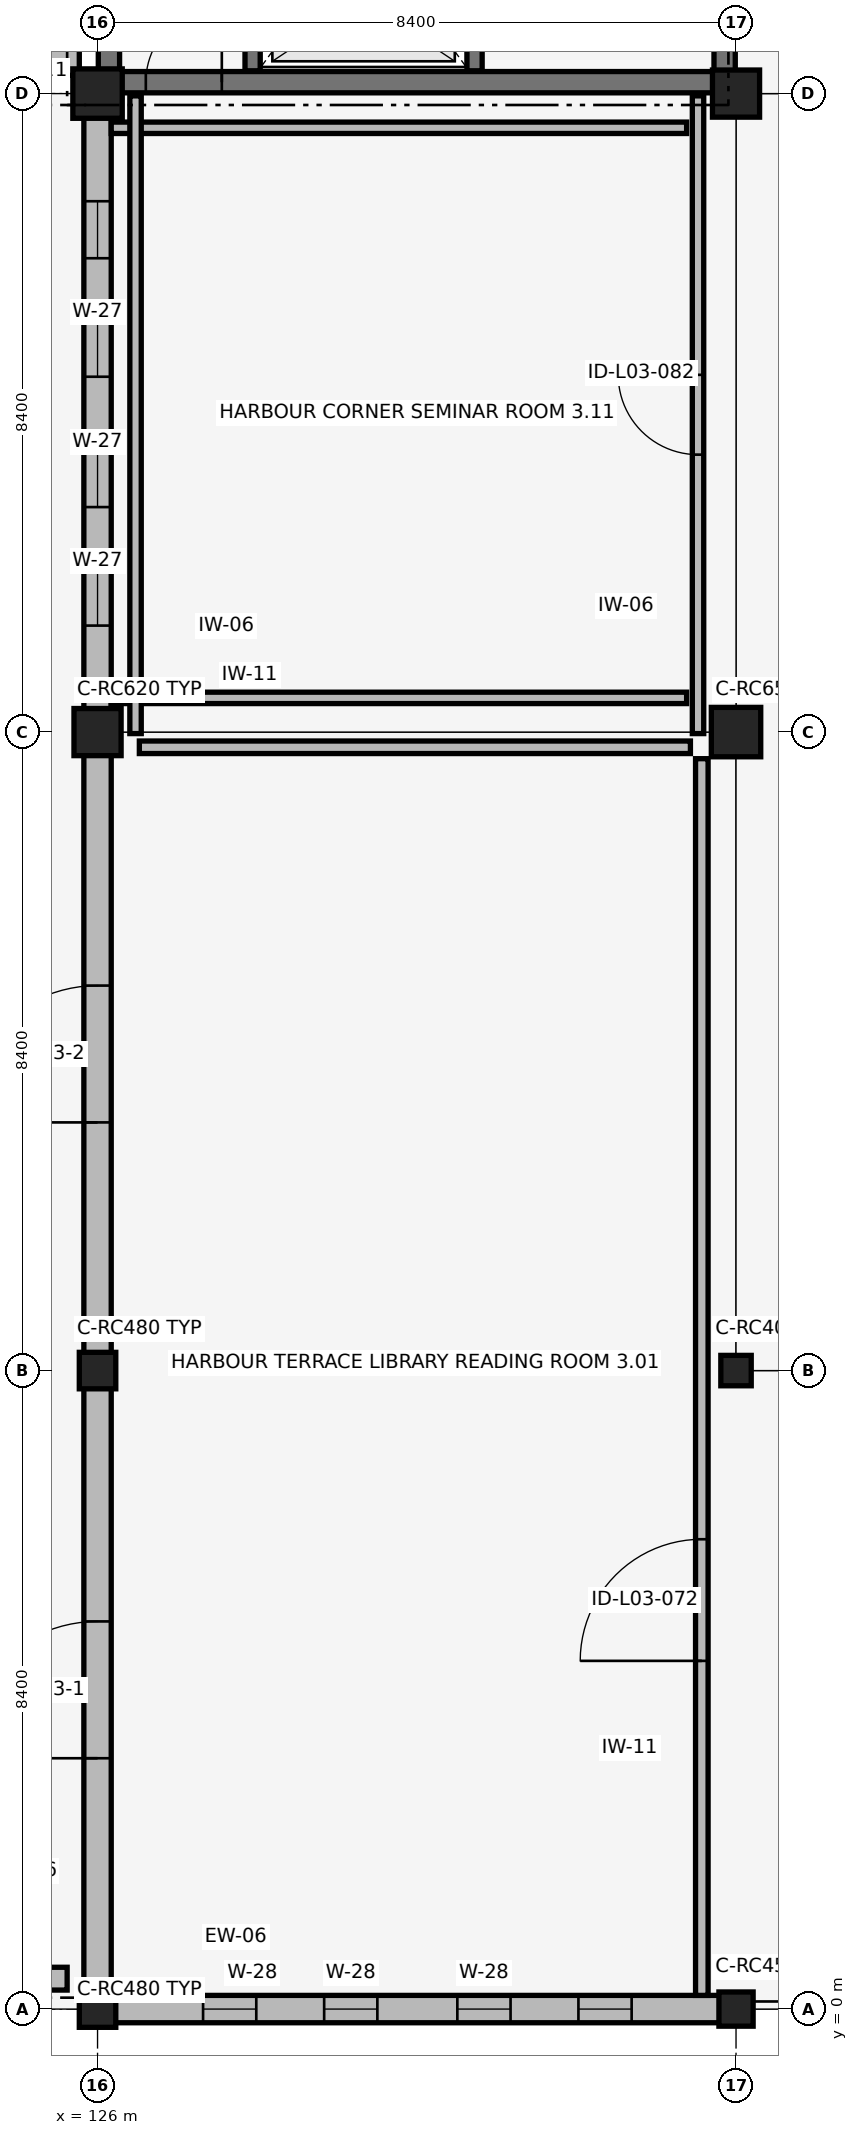
"""IFC4 building model, lengths in metres.
Left out: names, types, materials, properties, quantities, classifications, styles, units other than length and angle.
Written with IfcOpenShell. Run it as: python <this file> out.ifc"""

import sys

from ifc_helpers import new_model, si_unit, direction, frame, frame_2d, origin, origin_2d, place, context, subcontext, project, spatial, rectangle, extrude, element, fill, save


model = new_model("IFC4")
c1 = context("Model", 3, precision=1e-05, world=origin(), true_north=direction((0.0, 1.0)))
c2 = subcontext(c1, "Body", "Model", "MODEL_VIEW")
j1 = project(units=[si_unit("LENGTHUNIT", "METRE"), si_unit("PLANEANGLEUNIT", "RADIAN")], contexts=[c1])
p1 = place(None, origin())
s1 = spatial("IfcSite", under=j1, at=p1, CompositionType="ELEMENT")
p2 = place(p1, origin())
s2 = spatial("IfcBuilding", under=s1, at=p2, CompositionType="ELEMENT")
p3 = place(p2, frame((0.0, 0.0, 13.94)))
s3 = spatial("IfcBuildingStorey", under=s2, at=p3, CompositionType="ELEMENT", Elevation=13.94)
p4 = place(p3, frame((126.15, 25.35, 0.0), z_axis=(0.0, 0.0, 1.0), x_axis=(1.0, 0.0, 0.0)))
e1 = element("IfcWall", 1, at=p4, inside=s3, PredefinedType="SHEAR", context=c2, shape_type="SweptSolid", body=[
    extrude(rectangle(XDim=8.1, YDim=0.28, at=frame_2d((4.05, 0.0))), origin(), (0.0, 0.0, 1.0), 3.78),
])
p5 = place(p4, frame((0.485, 0.0, 0.0)))
e2 = element("IfcOpeningElement", 2, at=p5, cuts=e1, PredefinedType="OPENING", context=c2, shape_type="SweptSolid", body=[
    extrude(rectangle(XDim=1.0, YDim=2.15, at=frame_2d((0.5, 1.075))), frame((0.0, 0.15, 0.0), z_axis=(0.0, -1.0, 0.0), x_axis=(1.0, 0.0, 0.0)), (0.0, 0.0, 1.0), 0.3),
])
p6 = place(p3, frame((126.15, 25.35, 0.0), z_axis=(0.0, 0.0, 1.0), x_axis=(0.0, 1.0, 0.0)))
e3 = element("IfcWall", 3, at=p6, inside=s3, PredefinedType="SHEAR", context=c2, shape_type="SweptSolid", body=[
    extrude(rectangle(XDim=8.1, YDim=0.28, at=frame_2d((4.05, 0.0))), origin(), (0.0, 0.0, 1.0), 3.78),
])
p7 = place(p3, frame((134.25, 25.35, 0.0), z_axis=(0.0, 0.0, 1.0), x_axis=(0.0, 1.0, 0.0)))
e4 = element("IfcWall", 4, at=p7, inside=s3, PredefinedType="SHEAR", context=c2, shape_type="SweptSolid", body=[
    extrude(rectangle(XDim=8.1, YDim=0.28, at=frame_2d((4.05, 0.0))), origin(), (0.0, 0.0, 1.0), 3.78),
])
p8 = place(p7, frame((1.325, 0.0, 0.0)))
e5 = element("IfcOpeningElement", 5, at=p8, cuts=e4, PredefinedType="OPENING", context=c2, shape_type="SweptSolid", body=[
    extrude(rectangle(XDim=1.45, YDim=2.15, at=frame_2d((0.725, 1.075))), frame((0.0, 0.15, 0.0), z_axis=(0.0, -1.0, 0.0), x_axis=(1.0, 0.0, 0.0)), (0.0, 0.0, 1.0), 0.3),
])
for number, where, z_axis, x_axis in (
    (6, (126.0, 0.0, 0.0), (0.0, 0.0, 1.0), (1.0, 0.0, 0.0)),
    (7, (126.0, 8.4, 0.0), (0.0, 0.0, 1.0), (1.0, 0.0, 0.0)),
):
    element("IfcColumn", number, at=place(p3, frame(where, z_axis=z_axis, x_axis=x_axis)), inside=s3, PredefinedType="COLUMN", context=c2, shape_type="SweptSolid", body=[
        extrude(rectangle(XDim=0.48, YDim=0.48, at=origin_2d()), origin(), (0.0, 0.0, 1.0), 3.78),
    ])
p9 = place(p3, frame((126.0, 16.8, 0.0), z_axis=(0.0, 0.0, 1.0), x_axis=(1.0, 0.0, 0.0)))
e8 = element("IfcColumn", 8, at=p9, inside=s3, PredefinedType="COLUMN", context=c2, shape_type="SweptSolid", body=[
    extrude(rectangle(XDim=0.62, YDim=0.62, at=origin_2d()), origin(), (0.0, 0.0, 1.0), 3.78),
])
p10 = place(p3, frame((126.0, 25.2, 0.0), z_axis=(0.0, 0.0, 1.0), x_axis=(1.0, 0.0, 0.0)))
e9 = element("IfcColumn", 9, at=p10, inside=s3, PredefinedType="COLUMN", context=c2, shape_type="SweptSolid", body=[
    extrude(rectangle(XDim=0.65, YDim=0.65, at=origin_2d()), origin(), (0.0, 0.0, 1.0), 3.78),
])
p11 = place(p3, frame((134.4, 0.0, 0.0), z_axis=(0.0, 0.0, 1.0), x_axis=(1.0, 0.0, 0.0)))
e10 = element("IfcColumn", 10, at=p11, inside=s3, PredefinedType="COLUMN", context=c2, shape_type="SweptSolid", body=[
    extrude(rectangle(XDim=0.45, YDim=0.45, at=origin_2d()), origin(), (0.0, 0.0, 1.0), 3.78),
])
p12 = place(p3, frame((134.4, 8.4, 0.0), z_axis=(0.0, 0.0, 1.0), x_axis=(1.0, 0.0, 0.0)))
e11 = element("IfcColumn", 11, at=p12, inside=s3, PredefinedType="COLUMN", context=c2, shape_type="SweptSolid", body=[
    extrude(rectangle(XDim=0.4, YDim=0.4, at=origin_2d()), origin(), (0.0, 0.0, 1.0), 3.78),
])
p13 = place(p3, frame((134.4, 16.8, 0.0), z_axis=(0.0, 0.0, 1.0), x_axis=(1.0, 0.0, 0.0)))
e12 = element("IfcColumn", 12, at=p13, inside=s3, PredefinedType="COLUMN", context=c2, shape_type="SweptSolid", body=[
    extrude(rectangle(XDim=0.65, YDim=0.65, at=origin_2d()), origin(), (0.0, 0.0, 1.0), 3.78),
])
p14 = place(p3, frame((134.4, 25.2, 0.0), z_axis=(0.0, 0.0, 1.0), x_axis=(1.0, 0.0, 0.0)))
e13 = element("IfcColumn", 13, at=p14, inside=s3, PredefinedType="COLUMN", context=c2, shape_type="SweptSolid", body=[
    extrude(rectangle(XDim=0.62, YDim=0.62, at=origin_2d()), origin(), (0.0, 0.0, 1.0), 3.78),
])
p15 = place(p3, frame((126.225, 0.0, 0.0), z_axis=(0.0, 0.0, 1.0), x_axis=(1.0, 0.0, 0.0)))
e14 = element("IfcWall", 14, at=p15, inside=s3, PredefinedType="SOLIDWALL", context=c2, shape_type="SweptSolid", body=[
    extrude(rectangle(XDim=7.965, YDim=0.36, at=frame_2d((3.982, 0.0))), origin(), (0.0, 0.0, 1.0), 3.78),
])
p16 = place(p15, frame((1.163, 0.0, 0.75)))
e15 = element("IfcOpeningElement", 15, at=p16, cuts=e14, PredefinedType="OPENING", context=c2, shape_type="SweptSolid", body=[
    extrude(rectangle(XDim=0.7, YDim=1.95, at=frame_2d((0.35, 0.975))), frame((0.0, 0.19, 0.0), z_axis=(0.0, -1.0, 0.0), x_axis=(1.0, 0.0, 0.0)), (0.0, 0.0, 1.0), 0.38),
])
p17 = place(p15, frame((2.756, 0.0, 0.75)))
e16 = element("IfcOpeningElement", 16, at=p17, cuts=e14, PredefinedType="OPENING", context=c2, shape_type="SweptSolid", body=[
    extrude(rectangle(XDim=0.7, YDim=1.95, at=frame_2d((0.35, 0.975))), frame((0.0, 0.19, 0.0), z_axis=(0.0, -1.0, 0.0), x_axis=(1.0, 0.0, 0.0)), (0.0, 0.0, 1.0), 0.38),
])
p18 = place(p15, frame((4.509, 0.0, 0.75)))
e17 = element("IfcOpeningElement", 17, at=p18, cuts=e14, PredefinedType="OPENING", context=c2, shape_type="SweptSolid", body=[
    extrude(rectangle(XDim=0.7, YDim=1.95, at=frame_2d((0.35, 0.975))), frame((0.0, 0.19, 0.0), z_axis=(0.0, -1.0, 0.0), x_axis=(1.0, 0.0, 0.0)), (0.0, 0.0, 1.0), 0.38),
])
p19 = place(p15, frame((6.102, 0.0, 0.75)))
e18 = element("IfcOpeningElement", 18, at=p19, cuts=e14, PredefinedType="OPENING", context=c2, shape_type="SweptSolid", body=[
    extrude(rectangle(XDim=0.7, YDim=1.95, at=frame_2d((0.35, 0.975))), frame((0.0, 0.19, 0.0), z_axis=(0.0, -1.0, 0.0), x_axis=(1.0, 0.0, 0.0)), (0.0, 0.0, 1.0), 0.38),
])
p20 = place(p3, frame((126.0, 0.225, 0.0), z_axis=(0.0, 0.0, 1.0), x_axis=(0.0, 1.0, 0.0)))
e19 = element("IfcWall", 19, at=p20, inside=s3, PredefinedType="SOLIDWALL", context=c2, shape_type="SweptSolid", body=[
    extrude(rectangle(XDim=7.95, YDim=0.36, at=frame_2d((3.975, 0.0))), origin(), (0.0, 0.0, 1.0), 3.78),
])
p21 = place(p20, frame((3.075, 0.0, 0.0)))
e20 = element("IfcOpeningElement", 20, at=p21, cuts=e19, PredefinedType="OPENING", context=c2, shape_type="SweptSolid", body=[
    extrude(rectangle(XDim=1.8, YDim=2.2, at=frame_2d((0.9, 1.1))), frame((0.0, 0.19, 0.0), z_axis=(0.0, -1.0, 0.0), x_axis=(1.0, 0.0, 0.0)), (0.0, 0.0, 1.0), 0.38),
])
p22 = place(p3, frame((126.0, 8.625, 0.0), z_axis=(0.0, 0.0, 1.0), x_axis=(0.0, 1.0, 0.0)))
e21 = element("IfcWall", 21, at=p22, inside=s3, PredefinedType="SOLIDWALL", context=c2, shape_type="SweptSolid", body=[
    extrude(rectangle(XDim=7.88, YDim=0.36, at=frame_2d((3.94, 0.0))), origin(), (0.0, 0.0, 1.0), 3.78),
])
p23 = place(p22, frame((3.04, 0.0, 0.0)))
e22 = element("IfcOpeningElement", 22, at=p23, cuts=e21, PredefinedType="OPENING", context=c2, shape_type="SweptSolid", body=[
    extrude(rectangle(XDim=1.8, YDim=2.2, at=frame_2d((0.9, 1.1))), frame((0.0, 0.19, 0.0), z_axis=(0.0, -1.0, 0.0), x_axis=(1.0, 0.0, 0.0)), (0.0, 0.0, 1.0), 0.38),
])
p24 = place(p3, frame((126.0, 17.095, 0.0), z_axis=(0.0, 0.0, 1.0), x_axis=(0.0, 1.0, 0.0)))
e23 = element("IfcWall", 23, at=p24, inside=s3, PredefinedType="SOLIDWALL", context=c2, shape_type="SweptSolid", body=[
    extrude(rectangle(XDim=7.795, YDim=0.36, at=frame_2d((3.897, 0.0))), origin(), (0.0, 0.0, 1.0), 3.15),
])
p25 = place(p24, frame((1.106, 0.0, 0.7)))
e24 = element("IfcOpeningElement", 24, at=p25, cuts=e23, PredefinedType="OPENING", context=c2, shape_type="SweptSolid", body=[
    extrude(rectangle(XDim=0.75, YDim=2.1, at=frame_2d((0.375, 1.05))), frame((0.0, 0.19, 0.0), z_axis=(0.0, -1.0, 0.0), x_axis=(1.0, 0.0, 0.0)), (0.0, 0.0, 1.0), 0.38),
])
p26 = place(p24, frame((2.665, 0.0, 0.7)))
e25 = element("IfcOpeningElement", 25, at=p26, cuts=e23, PredefinedType="OPENING", context=c2, shape_type="SweptSolid", body=[
    extrude(rectangle(XDim=0.75, YDim=2.1, at=frame_2d((0.375, 1.05))), frame((0.0, 0.19, 0.0), z_axis=(0.0, -1.0, 0.0), x_axis=(1.0, 0.0, 0.0)), (0.0, 0.0, 1.0), 0.38),
])
p27 = place(p24, frame((4.38, 0.0, 0.7)))
e26 = element("IfcOpeningElement", 26, at=p27, cuts=e23, PredefinedType="OPENING", context=c2, shape_type="SweptSolid", body=[
    extrude(rectangle(XDim=0.75, YDim=2.1, at=frame_2d((0.375, 1.05))), frame((0.0, 0.19, 0.0), z_axis=(0.0, -1.0, 0.0), x_axis=(1.0, 0.0, 0.0)), (0.0, 0.0, 1.0), 0.38),
])
p28 = place(p24, frame((5.939, 0.0, 0.7)))
e27 = element("IfcOpeningElement", 27, at=p28, cuts=e23, PredefinedType="OPENING", context=c2, shape_type="SweptSolid", body=[
    extrude(rectangle(XDim=0.75, YDim=2.1, at=frame_2d((0.375, 1.05))), frame((0.0, 0.19, 0.0), z_axis=(0.0, -1.0, 0.0), x_axis=(1.0, 0.0, 0.0)), (0.0, 0.0, 1.0), 0.38),
])
p29 = place(p3, frame((125.52, 25.44, 0.0), z_axis=(0.0, 0.0, 1.0), x_axis=(0.0, 1.0, 0.0)))
e28 = element("IfcWall", 28, at=p29, inside=s3, PredefinedType="SOLIDWALL", context=c2, shape_type="SweptSolid", body=[
    extrude(rectangle(XDim=7.92, YDim=0.48, at=frame_2d((3.96, 0.0))), origin(), (0.0, 0.0, 1.0), 4.08),
])
p30 = place(p3, frame((101.6, 0.4, 0.0), z_axis=(0.0, 0.0, 1.0), x_axis=(1.0, 0.0, 0.0)))
e29 = element("IfcWall", 29, at=p30, inside=s3, PredefinedType="PARAPET", context=c2, shape_type="SweptSolid", body=[
    extrude(rectangle(XDim=24.0, YDim=0.3, at=frame_2d((12.0, 0.0))), origin(), (0.0, 0.0, 1.0), 0.45),
])
p31 = place(p3, frame((130.96, 25.5, 0.0), z_axis=(0.0, 0.0, 1.0), x_axis=(0.0, 1.0, 0.0)))
e30 = element("IfcWall", 30, at=p31, inside=s3, PredefinedType="SHEAR", context=c2, shape_type="SweptSolid", body=[
    extrude(rectangle(XDim=3.8, YDim=0.2, at=frame_2d((1.9, 0.0))), origin(), (0.0, 0.0, 1.0), 3.78),
])
p32 = place(p31, frame((0.375, 0.0, 0.0)))
e31 = element("IfcOpeningElement", 31, at=p32, cuts=e30, PredefinedType="OPENING", context=c2, shape_type="SweptSolid", body=[
    extrude(rectangle(XDim=1.1, YDim=2.15, at=frame_2d((0.55, 1.075))), frame((0.0, 0.11, 0.0), z_axis=(0.0, -1.0, 0.0), x_axis=(1.0, 0.0, 0.0)), (0.0, 0.0, 1.0), 0.22),
])
p33 = place(p31, frame((2.325, 0.0, 0.0)))
e32 = element("IfcOpeningElement", 32, at=p33, cuts=e30, PredefinedType="OPENING", context=c2, shape_type="SweptSolid", body=[
    extrude(rectangle(XDim=1.1, YDim=2.15, at=frame_2d((0.55, 1.075))), frame((0.0, 0.11, 0.0), z_axis=(0.0, -1.0, 0.0), x_axis=(1.0, 0.0, 0.0)), (0.0, 0.0, 1.0), 0.22),
])
p34 = place(p3, frame((128.04, 25.5, 0.0), z_axis=(0.0, 0.0, 1.0), x_axis=(0.0, 1.0, 0.0)))
e33 = element("IfcWall", 33, at=p34, inside=s3, PredefinedType="SHEAR", context=c2, shape_type="SweptSolid", body=[
    extrude(rectangle(XDim=3.8, YDim=0.2, at=frame_2d((1.9, 0.0))), origin(), (0.0, 0.0, 1.0), 3.78),
])
p35 = place(p3, frame((133.95, 0.18, 0.0), z_axis=(0.0, 0.0, 1.0), x_axis=(0.0, 1.0, 0.0)))
e34 = element("IfcWall", 34, at=p35, inside=s3, PredefinedType="PARTITIONING", context=c2, shape_type="SweptSolid", body=[
    extrude(rectangle(XDim=16.27, YDim=0.165, at=frame_2d((8.135, 0.0))), origin(), (0.0, 0.0, 1.0), 3.78),
])
p36 = place(p35, frame((4.401, 0.0, 0.0)))
e35 = element("IfcOpeningElement", 35, at=p36, cuts=e34, PredefinedType="OPENING", context=c2, shape_type="SweptSolid", body=[
    extrude(rectangle(XDim=1.6, YDim=2.25, at=frame_2d((0.8, 1.125))), frame((0.0, 0.093, 0.0), z_axis=(0.0, -1.0, 0.0), x_axis=(1.0, 0.0, 0.0)), (0.0, 0.0, 1.0), 0.185),
])
p37 = place(p3, frame((126.55, 16.6, 0.0), z_axis=(0.0, 0.0, 1.0), x_axis=(1.0, 0.0, 0.0)))
e36 = element("IfcWall", 36, at=p37, inside=s3, PredefinedType="PARTITIONING", context=c2, shape_type="SweptSolid", body=[
    extrude(rectangle(XDim=7.25, YDim=0.165, at=frame_2d((3.625, 0.0))), origin(), (0.0, 0.0, 1.0), 3.15),
])
p38 = place(p3, frame((126.18, 24.75, 0.0), z_axis=(0.0, 0.0, 1.0), x_axis=(1.0, 0.0, 0.0)))
e37 = element("IfcWall", 37, at=p38, inside=s3, PredefinedType="PARTITIONING", context=c2, shape_type="SweptSolid", body=[
    extrude(rectangle(XDim=7.57, YDim=0.15, at=frame_2d((3.785, 0.0))), origin(), (0.0, 0.0, 1.0), 3.15),
])
p39 = place(p3, frame((133.9, 16.78, 0.0), z_axis=(0.0, 0.0, 1.0), x_axis=(0.0, 1.0, 0.0)))
e38 = element("IfcWall", 38, at=p39, inside=s3, PredefinedType="PARTITIONING", context=c2, shape_type="SweptSolid", body=[
    extrude(rectangle(XDim=8.39, YDim=0.15, at=frame_2d((4.195, 0.0))), origin(), (0.0, 0.0, 1.0), 3.13),
])
p40 = place(p39, frame((3.67, 0.0, 0.0)))
e39 = element("IfcOpeningElement", 39, at=p40, cuts=e38, PredefinedType="OPENING", context=c2, shape_type="SweptSolid", body=[
    extrude(rectangle(XDim=1.05, YDim=2.15, at=frame_2d((0.525, 1.075))), frame((0.0, 0.085, 0.0), z_axis=(0.0, -1.0, 0.0), x_axis=(1.0, 0.0, 0.0)), (0.0, 0.0, 1.0), 0.17),
])
p41 = place(p3, frame((126.18, 17.25, 0.0), z_axis=(0.0, 0.0, 1.0), x_axis=(1.0, 0.0, 0.0)))
e40 = element("IfcWall", 40, at=p41, inside=s3, PredefinedType="PARTITIONING", context=c2, shape_type="SweptSolid", body=[
    extrude(rectangle(XDim=7.57, YDim=0.15, at=frame_2d((3.785, 0.0))), origin(), (0.0, 0.0, 1.0), 3.15),
])
p42 = place(p3, frame((126.5, 16.78, 0.0), z_axis=(0.0, 0.0, 1.0), x_axis=(0.0, 1.0, 0.0)))
e41 = element("IfcWall", 41, at=p42, inside=s3, PredefinedType="PARTITIONING", context=c2, shape_type="SweptSolid", body=[
    extrude(rectangle(XDim=8.39, YDim=0.15, at=frame_2d((4.195, 0.0))), origin(), (0.0, 0.0, 1.0), 3.13),
])
p43 = place(p16, origin())
e42 = element("IfcWindow", 42, at=p43, inside=s3, PartitioningType="DOUBLE_PANEL_VERTICAL", PredefinedType="WINDOW", context=c2, shape_type="SweptSolid", body=[
    extrude(rectangle(XDim=0.7, YDim=1.95, at=frame_2d((0.35, 0.975))), frame((0.0, 0.03, 0.0), z_axis=(0.0, -1.0, 0.0), x_axis=(1.0, 0.0, 0.0)), (0.0, 0.0, 1.0), 0.06),
])
fill(e15, e42)
p44 = place(p17, origin())
e43 = element("IfcWindow", 43, at=p44, inside=s3, PartitioningType="DOUBLE_PANEL_VERTICAL", PredefinedType="WINDOW", context=c2, shape_type="SweptSolid", body=[
    extrude(rectangle(XDim=0.7, YDim=1.95, at=frame_2d((0.35, 0.975))), frame((0.0, 0.03, 0.0), z_axis=(0.0, -1.0, 0.0), x_axis=(1.0, 0.0, 0.0)), (0.0, 0.0, 1.0), 0.06),
])
fill(e16, e43)
p45 = place(p18, origin())
e44 = element("IfcWindow", 44, at=p45, inside=s3, PartitioningType="DOUBLE_PANEL_VERTICAL", PredefinedType="WINDOW", context=c2, shape_type="SweptSolid", body=[
    extrude(rectangle(XDim=0.7, YDim=1.95, at=frame_2d((0.35, 0.975))), frame((0.0, 0.03, 0.0), z_axis=(0.0, -1.0, 0.0), x_axis=(1.0, 0.0, 0.0)), (0.0, 0.0, 1.0), 0.06),
])
fill(e17, e44)
p46 = place(p19, origin())
e45 = element("IfcWindow", 45, at=p46, inside=s3, PartitioningType="DOUBLE_PANEL_VERTICAL", PredefinedType="WINDOW", context=c2, shape_type="SweptSolid", body=[
    extrude(rectangle(XDim=0.7, YDim=1.95, at=frame_2d((0.35, 0.975))), frame((0.0, 0.03, 0.0), z_axis=(0.0, -1.0, 0.0), x_axis=(1.0, 0.0, 0.0)), (0.0, 0.0, 1.0), 0.06),
])
fill(e18, e45)
p47 = place(p21, origin())
e46 = element("IfcDoor", 46, at=p47, inside=s3, OperationType="DOUBLE_DOOR_SINGLE_SWING", PredefinedType="DOOR", context=c2, shape_type="SweptSolid", body=[
    extrude(rectangle(XDim=1.8, YDim=2.2, at=frame_2d((0.9, 1.1))), frame((0.0, 0.025, 0.0), z_axis=(0.0, -1.0, 0.0), x_axis=(1.0, 0.0, 0.0)), (0.0, 0.0, 1.0), 0.05),
])
fill(e20, e46)
p48 = place(p23, origin())
e47 = element("IfcDoor", 47, at=p48, inside=s3, OperationType="DOUBLE_DOOR_SINGLE_SWING", PredefinedType="DOOR", context=c2, shape_type="SweptSolid", body=[
    extrude(rectangle(XDim=1.8, YDim=2.2, at=frame_2d((0.9, 1.1))), frame((0.0, 0.025, 0.0), z_axis=(0.0, -1.0, 0.0), x_axis=(1.0, 0.0, 0.0)), (0.0, 0.0, 1.0), 0.05),
])
fill(e22, e47)
p49 = place(p25, origin())
e48 = element("IfcWindow", 48, at=p49, inside=s3, PartitioningType="DOUBLE_PANEL_VERTICAL", PredefinedType="WINDOW", context=c2, shape_type="SweptSolid", body=[
    extrude(rectangle(XDim=0.75, YDim=2.1, at=frame_2d((0.375, 1.05))), frame((0.0, 0.03, 0.0), z_axis=(0.0, -1.0, 0.0), x_axis=(1.0, 0.0, 0.0)), (0.0, 0.0, 1.0), 0.06),
])
fill(e24, e48)
p50 = place(p26, origin())
e49 = element("IfcWindow", 49, at=p50, inside=s3, PartitioningType="DOUBLE_PANEL_VERTICAL", PredefinedType="WINDOW", context=c2, shape_type="SweptSolid", body=[
    extrude(rectangle(XDim=0.75, YDim=2.1, at=frame_2d((0.375, 1.05))), frame((0.0, 0.03, 0.0), z_axis=(0.0, -1.0, 0.0), x_axis=(1.0, 0.0, 0.0)), (0.0, 0.0, 1.0), 0.06),
])
fill(e25, e49)
p51 = place(p27, origin())
e50 = element("IfcWindow", 50, at=p51, inside=s3, PartitioningType="DOUBLE_PANEL_VERTICAL", PredefinedType="WINDOW", context=c2, shape_type="SweptSolid", body=[
    extrude(rectangle(XDim=0.75, YDim=2.1, at=frame_2d((0.375, 1.05))), frame((0.0, 0.03, 0.0), z_axis=(0.0, -1.0, 0.0), x_axis=(1.0, 0.0, 0.0)), (0.0, 0.0, 1.0), 0.06),
])
fill(e26, e50)
p52 = place(p28, origin())
e51 = element("IfcWindow", 51, at=p52, inside=s3, PartitioningType="DOUBLE_PANEL_VERTICAL", PredefinedType="WINDOW", context=c2, shape_type="SweptSolid", body=[
    extrude(rectangle(XDim=0.75, YDim=2.1, at=frame_2d((0.375, 1.05))), frame((0.0, 0.03, 0.0), z_axis=(0.0, -1.0, 0.0), x_axis=(1.0, 0.0, 0.0)), (0.0, 0.0, 1.0), 0.06),
])
fill(e27, e51)
p53 = place(p5, origin())
e52 = element("IfcDoor", 52, at=p53, inside=s3, OperationType="SINGLE_SWING_RIGHT", PredefinedType="DOOR", context=c2, shape_type="SweptSolid", body=[
    extrude(rectangle(XDim=1.0, YDim=2.15, at=frame_2d((0.5, 1.075))), frame((0.0, 0.025, 0.0), z_axis=(0.0, -1.0, 0.0), x_axis=(1.0, 0.0, 0.0)), (0.0, 0.0, 1.0), 0.05),
])
fill(e2, e52)
p54 = place(p36, origin())
e53 = element("IfcDoor", 53, at=p54, inside=s3, OperationType="DOUBLE_DOOR_SINGLE_SWING", PredefinedType="DOOR", context=c2, shape_type="SweptSolid", body=[
    extrude(rectangle(XDim=1.6, YDim=2.25, at=frame_2d((0.8, 1.125))), frame((0.0, 0.025, 0.0), z_axis=(0.0, -1.0, 0.0), x_axis=(1.0, 0.0, 0.0)), (0.0, 0.0, 1.0), 0.05),
])
fill(e35, e53)
p55 = place(p40, origin())
e54 = element("IfcDoor", 54, at=p55, inside=s3, OperationType="SINGLE_SWING_RIGHT", PredefinedType="DOOR", context=c2, shape_type="SweptSolid", body=[
    extrude(rectangle(XDim=1.05, YDim=2.15, at=frame_2d((0.525, 1.075))), frame((0.0, 0.025, 0.0), z_axis=(0.0, -1.0, 0.0), x_axis=(1.0, 0.0, 0.0)), (0.0, 0.0, 1.0), 0.05),
])
fill(e39, e54)
save(model, sys.argv[1])
